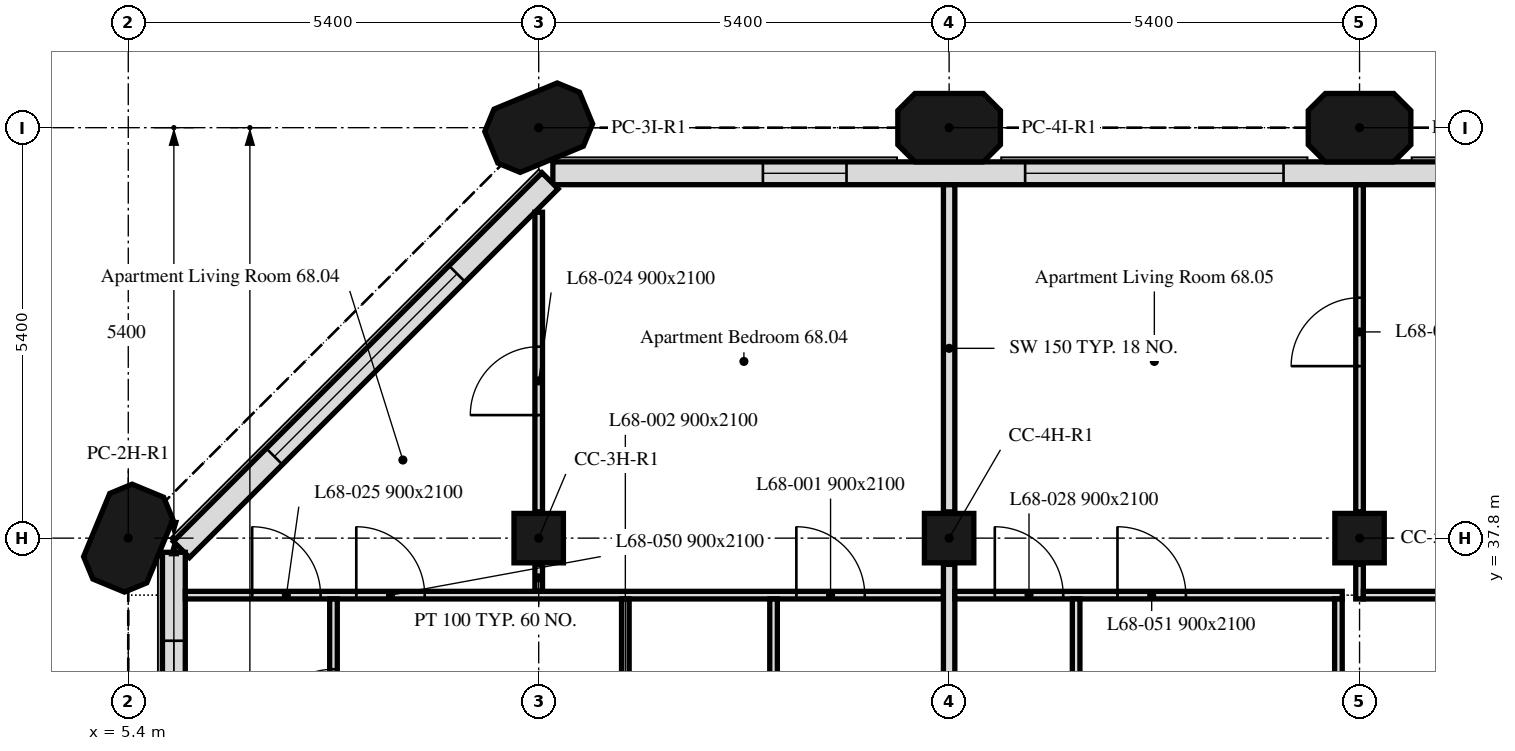
"""IFC4 building model, lengths in metres.
Left out: names, types, materials, properties, quantities, classifications, styles, units other than length and angle.
Written with IfcOpenShell. Run it as: python <this file> out.ifc"""

import sys

from ifc_helpers import new_model, si_unit, direction, frame, frame_2d, origin, origin_2d, place, context, subcontext, project, spatial, polyline, rectangle, outline, extrude, element, fill, save


model = new_model("IFC4")
c1 = context("Model", 3, precision=1e-05, world=origin(), true_north=direction((0.0, 1.0)))
c2 = subcontext(c1, "Body", "Model", "MODEL_VIEW")
j1 = project(units=[si_unit("LENGTHUNIT", "METRE"), si_unit("PLANEANGLEUNIT", "RADIAN")], contexts=[c1])
p1 = place(None, origin())
s1 = spatial("IfcSite", under=j1, at=p1, CompositionType="ELEMENT")
p2 = place(p1, origin())
s2 = spatial("IfcBuilding", under=s1, at=p2, CompositionType="ELEMENT")
p3 = place(p2, frame((0.0, 0.0, 278.5)))
s3 = spatial("IfcBuildingStorey", under=s2, at=p3, CompositionType="ELEMENT", Elevation=278.5)
p4 = place(p3, frame((5.4, 37.8, 0.0), z_axis=(0.0, 0.0, 1.0), x_axis=(0.382683432365, 0.923879532511, 0.0)))
e1 = element("IfcColumn", 1, at=p4, inside=s3, PredefinedType="COLUMN", context=c2, shape_type="SweptSolid", body=[
    extrude(outline(polyline([(-0.45, -0.45), (0.45, -0.45), (0.675, -0.225), (0.675, 0.225), (0.45, 0.45), (-0.45, 0.45), (-0.675, 0.225), (-0.675, -0.225), (-0.45, -0.45)])), origin(), (0.0, 0.0, 1.0), 3.0),
])
for number, where, z_axis, x_axis in (
    (2, (10.8, 37.8, 0.0), (0.0, 0.0, 1.0), (1.0, 0.0, 0.0)),
    (3, (16.2, 37.8, 0.0), (0.0, 0.0, 1.0), (1.0, 0.0, 0.0)),
    (4, (21.6, 37.8, 0.0), (0.0, 0.0, 1.0), (1.0, 0.0, 0.0)),
):
    element("IfcColumn", number, at=place(p3, frame(where, z_axis=z_axis, x_axis=x_axis)), inside=s3, PredefinedType="COLUMN", context=c2, shape_type="SweptSolid", body=[
        extrude(rectangle(XDim=0.65, YDim=0.65, at=origin_2d()), origin(), (0.0, 0.0, 1.0), 3.0),
    ])
for number, where, z_axis, x_axis in (
    (5, (10.8, 43.2, 0.0), (0.0, 0.0, 1.0), (0.924, 0.383, 0.0)),
    (6, (16.2, 43.2, 0.0), (0.0, 0.0, 1.0), (1.0, 0.0, 0.0)),
    (7, (21.6, 43.2, 0.0), (0.0, 0.0, 1.0), (1.0, 0.0, 0.0)),
):
    element("IfcColumn", number, at=place(p3, frame(where, z_axis=z_axis, x_axis=x_axis)), inside=s3, PredefinedType="COLUMN", context=c2, shape_type="SweptSolid", body=[
        extrude(outline(polyline([(-0.45, -0.45), (0.45, -0.45), (0.675, -0.225), (0.675, 0.225), (0.45, 0.45), (-0.45, 0.45), (-0.675, 0.225), (-0.675, -0.225), (-0.45, -0.45)])), origin(), (0.0, 0.0, 1.0), 3.0),
    ])
p5 = place(p3, frame((43.014, 42.6, 0.0), z_axis=(0.0, 0.0, 1.0), x_axis=(-1.0, 0.0, 0.0)))
e8 = element("IfcWall", 8, at=p5, inside=s3, PredefinedType="SOLIDWALL", context=c2, shape_type="SweptSolid", body=[
    extrude(rectangle(XDim=32.027, YDim=0.3, at=frame_2d((16.014, 0.0))), origin(), (0.0, 0.0, 1.0), 3.0),
])
p6 = place(p5, frame((0.814, 0.0, 0.9)))
e9 = element("IfcOpeningElement", 9, at=p6, cuts=e8, PredefinedType="OPENING", context=c2, shape_type="SweptSolid", body=[
    extrude(rectangle(XDim=3.4, YDim=1.7, at=frame_2d((1.7, 0.85))), frame((0.0, 0.16, 0.0), z_axis=(0.0, -1.0, 0.0), x_axis=(1.0, 0.0, 0.0)), (0.0, 0.0, 1.0), 0.32),
])
p7 = place(p5, frame((6.564, 0.0, 0.9)))
e10 = element("IfcOpeningElement", 10, at=p7, cuts=e8, PredefinedType="OPENING", context=c2, shape_type="SweptSolid", body=[
    extrude(rectangle(XDim=1.1, YDim=1.7, at=frame_2d((0.55, 0.85))), frame((0.0, 0.16, 0.0), z_axis=(0.0, -1.0, 0.0), x_axis=(1.0, 0.0, 0.0)), (0.0, 0.0, 1.0), 0.32),
])
p8 = place(p5, frame((11.614, 0.0, 0.9)))
e11 = element("IfcOpeningElement", 11, at=p8, cuts=e8, PredefinedType="OPENING", context=c2, shape_type="SweptSolid", body=[
    extrude(rectangle(XDim=3.4, YDim=1.7, at=frame_2d((1.7, 0.85))), frame((0.0, 0.16, 0.0), z_axis=(0.0, -1.0, 0.0), x_axis=(1.0, 0.0, 0.0)), (0.0, 0.0, 1.0), 0.32),
])
p9 = place(p5, frame((17.364, 0.0, 0.9)))
e12 = element("IfcOpeningElement", 12, at=p9, cuts=e8, PredefinedType="OPENING", context=c2, shape_type="SweptSolid", body=[
    extrude(rectangle(XDim=1.1, YDim=1.7, at=frame_2d((0.55, 0.85))), frame((0.0, 0.16, 0.0), z_axis=(0.0, -1.0, 0.0), x_axis=(1.0, 0.0, 0.0)), (0.0, 0.0, 1.0), 0.32),
])
p10 = place(p5, frame((22.414, 0.0, 0.9)))
e13 = element("IfcOpeningElement", 13, at=p10, cuts=e8, PredefinedType="OPENING", context=c2, shape_type="SweptSolid", body=[
    extrude(rectangle(XDim=3.4, YDim=1.7, at=frame_2d((1.7, 0.85))), frame((0.0, 0.16, 0.0), z_axis=(0.0, -1.0, 0.0), x_axis=(1.0, 0.0, 0.0)), (0.0, 0.0, 1.0), 0.32),
])
p11 = place(p5, frame((28.164, 0.0, 0.9)))
e14 = element("IfcOpeningElement", 14, at=p11, cuts=e8, PredefinedType="OPENING", context=c2, shape_type="SweptSolid", body=[
    extrude(rectangle(XDim=1.1, YDim=1.7, at=frame_2d((0.55, 0.85))), frame((0.0, 0.16, 0.0), z_axis=(0.0, -1.0, 0.0), x_axis=(1.0, 0.0, 0.0)), (0.0, 0.0, 1.0), 0.32),
])
p12 = place(p3, frame((10.949, 42.501, 0.0), z_axis=(0.0, 0.0, 1.0), x_axis=(-0.707106781187, -0.707106781187, 0.0)))
e15 = element("IfcWall", 15, at=p12, inside=s3, PredefinedType="SOLIDWALL", context=c2, shape_type="SweptSolid", body=[
    extrude(rectangle(XDim=6.86, YDim=0.3, at=frame_2d((3.43, 0.0))), origin(), (0.0, 0.0, 1.0), 3.0),
])
p13 = place(p12, frame((1.73, 0.0, 0.9)))
e16 = element("IfcOpeningElement", 16, at=p13, cuts=e15, PredefinedType="OPENING", context=c2, shape_type="SweptSolid", body=[
    extrude(rectangle(XDim=3.4, YDim=1.7, at=frame_2d((1.7, 0.85))), frame((0.0, 0.16, 0.0), z_axis=(0.0, -1.0, 0.0), x_axis=(1.0, 0.0, 0.0)), (0.0, 0.0, 1.0), 0.32),
])
p14 = place(p3, frame((6.0, 37.614, 0.0), z_axis=(0.0, 0.0, 1.0), x_axis=(0.0, -1.0, 0.0)))
e17 = element("IfcWall", 17, at=p14, inside=s3, PredefinedType="SOLIDWALL", context=c2, shape_type="SweptSolid", body=[
    extrude(rectangle(XDim=5.214, YDim=0.3, at=frame_2d((2.607, 0.0))), origin(), (0.0, 0.0, 1.0), 3.0),
])
p15 = place(p14, frame((1.164, 0.0, 0.9)))
e18 = element("IfcOpeningElement", 18, at=p15, cuts=e17, PredefinedType="OPENING", context=c2, shape_type="SweptSolid", body=[
    extrude(rectangle(XDim=1.1, YDim=1.7, at=frame_2d((0.55, 0.85))), frame((0.0, 0.16, 0.0), z_axis=(0.0, -1.0, 0.0), x_axis=(1.0, 0.0, 0.0)), (0.0, 0.0, 1.0), 0.32),
])
p16 = place(p14, frame((2.589, 0.0, 0.9)))
e19 = element("IfcOpeningElement", 19, at=p16, cuts=e17, PredefinedType="OPENING", context=c2, shape_type="SweptSolid", body=[
    extrude(rectangle(XDim=0.65, YDim=1.7, at=frame_2d((0.325, 0.85))), frame((0.0, 0.16, 0.0), z_axis=(0.0, -1.0, 0.0), x_axis=(1.0, 0.0, 0.0)), (0.0, 0.0, 1.0), 0.32),
])
p17 = place(p3, frame((10.8, 37.1, 0.0), z_axis=(0.0, 0.0, 1.0), x_axis=(0.0, 1.0, 0.0)))
e20 = element("IfcWall", 20, at=p17, inside=s3, PredefinedType="PARTITIONING", context=c2, shape_type="SweptSolid", body=[
    extrude(rectangle(XDim=0.355, YDim=0.1, at=frame_2d((0.177, 0.0))), origin(), (0.0, 0.0, 1.0), 3.0),
])
p18 = place(p3, frame((10.8, 38.145, 0.0), z_axis=(0.0, 0.0, 1.0), x_axis=(0.0, 1.0, 0.0)))
e21 = element("IfcWall", 21, at=p18, inside=s3, PredefinedType="PARTITIONING", context=c2, shape_type="SweptSolid", body=[
    extrude(rectangle(XDim=3.943, YDim=0.1, at=frame_2d((1.971, 0.0))), origin(), (0.0, 0.0, 1.0), 3.0),
])
p19 = place(p18, frame((1.274, 0.0, 0.0)))
e22 = element("IfcOpeningElement", 22, at=p19, cuts=e21, PredefinedType="OPENING", context=c2, shape_type="SweptSolid", body=[
    extrude(rectangle(XDim=0.9, YDim=2.1, at=frame_2d((0.45, 1.05))), frame((0.0, 0.05, 0.0), z_axis=(0.0, -1.0, 0.0), x_axis=(1.0, 0.0, 0.0)), (0.0, 0.0, 1.0), 0.1),
])
p20 = place(p3, frame((6.151, 37.05, 0.0), z_axis=(0.0, 0.0, 1.0), x_axis=(1.0, 0.0, 0.0)))
e23 = element("IfcWall", 23, at=p20, inside=s3, PredefinedType="PARTITIONING", context=c2, shape_type="SweptSolid", body=[
    extrude(rectangle(XDim=9.974, YDim=0.1, at=frame_2d((4.987, 0.0))), origin(), (0.0, 0.0, 1.0), 3.0),
])
p21 = place(p20, frame((8.039, 0.0, 0.0)))
e24 = element("IfcOpeningElement", 24, at=p21, cuts=e23, PredefinedType="OPENING", context=c2, shape_type="SweptSolid", body=[
    extrude(rectangle(XDim=0.9, YDim=2.1, at=frame_2d((0.45, 1.05))), frame((0.0, 0.05, 0.0), z_axis=(0.0, -1.0, 0.0), x_axis=(1.0, 0.0, 0.0)), (0.0, 0.0, 1.0), 0.1),
])
p22 = place(p20, frame((0.879, 0.0, 0.0)))
e25 = element("IfcOpeningElement", 25, at=p22, cuts=e23, PredefinedType="OPENING", context=c2, shape_type="SweptSolid", body=[
    extrude(rectangle(XDim=0.9, YDim=2.1, at=frame_2d((0.45, 1.05))), frame((0.0, 0.05, 0.0), z_axis=(0.0, -1.0, 0.0), x_axis=(1.0, 0.0, 0.0)), (0.0, 0.0, 1.0), 0.1),
])
p23 = place(p20, frame((2.249, 0.0, 0.0)))
e26 = element("IfcOpeningElement", 26, at=p23, cuts=e23, PredefinedType="OPENING", context=c2, shape_type="SweptSolid", body=[
    extrude(rectangle(XDim=0.9, YDim=2.1, at=frame_2d((0.45, 1.05))), frame((0.0, 0.05, 0.0), z_axis=(0.0, -1.0, 0.0), x_axis=(1.0, 0.0, 0.0)), (0.0, 0.0, 1.0), 0.1),
])
p24 = place(p3, frame((16.2, 38.145, 0.0), z_axis=(0.0, 0.0, 1.0), x_axis=(0.0, 1.0, 0.0)))
e27 = element("IfcWall", 27, at=p24, inside=s3, PredefinedType="PARTITIONING", context=c2, shape_type="SweptSolid", body=[
    extrude(rectangle(XDim=4.304, YDim=0.15, at=frame_2d((2.152, 0.0))), origin(), (0.0, 0.0, 1.0), 3.0),
])
p25 = place(p3, frame((8.1, 34.275, 0.0), z_axis=(0.0, 0.0, 1.0), x_axis=(0.0, 1.0, 0.0)))
e28 = element("IfcWall", 28, at=p25, inside=s3, PredefinedType="PARTITIONING", context=c2, shape_type="SweptSolid", body=[
    extrude(rectangle(XDim=2.725, YDim=0.1, at=frame_2d((1.363, 0.0))), origin(), (0.0, 0.0, 1.0), 3.0),
])
p26 = place(p25, frame((0.9, 0.0, 0.0)))
e29 = element("IfcOpeningElement", 29, at=p26, cuts=e28, PredefinedType="OPENING", context=c2, shape_type="SweptSolid", body=[
    extrude(rectangle(XDim=0.9, YDim=2.1, at=frame_2d((0.45, 1.05))), frame((0.0, 0.05, 0.0), z_axis=(0.0, -1.0, 0.0), x_axis=(1.0, 0.0, 0.0)), (0.0, 0.0, 1.0), 0.1),
])
p27 = place(p3, frame((11.94, 34.275, 0.0), z_axis=(0.0, 0.0, 1.0), x_axis=(0.0, 1.0, 0.0)))
e30 = element("IfcWall", 30, at=p27, inside=s3, PredefinedType="PARTITIONING", context=c2, shape_type="SweptSolid", body=[
    extrude(rectangle(XDim=2.725, YDim=0.1, at=frame_2d((1.363, 0.0))), origin(), (0.0, 0.0, 1.0), 3.0),
])
p28 = place(p27, frame((0.281, 0.0, 0.0)))
e31 = element("IfcOpeningElement", 31, at=p28, cuts=e30, PredefinedType="OPENING", context=c2, shape_type="SweptSolid", body=[
    extrude(rectangle(XDim=0.9, YDim=2.1, at=frame_2d((0.45, 1.05))), frame((0.0, 0.05, 0.0), z_axis=(0.0, -1.0, 0.0), x_axis=(1.0, 0.0, 0.0)), (0.0, 0.0, 1.0), 0.1),
])
p29 = place(p3, frame((13.89, 34.275, 0.0), z_axis=(0.0, 0.0, 1.0), x_axis=(0.0, 1.0, 0.0)))
e32 = element("IfcWall", 32, at=p29, inside=s3, PredefinedType="PARTITIONING", context=c2, shape_type="SweptSolid", body=[
    extrude(rectangle(XDim=2.725, YDim=0.1, at=frame_2d((1.363, 0.0))), origin(), (0.0, 0.0, 1.0), 3.0),
])
p30 = place(p3, frame((16.2, 34.275, 0.0), z_axis=(0.0, 0.0, 1.0), x_axis=(0.0, 1.0, 0.0)))
e33 = element("IfcWall", 33, at=p30, inside=s3, PredefinedType="PARTITIONING", context=c2, shape_type="SweptSolid", body=[
    extrude(rectangle(XDim=3.18, YDim=0.15, at=frame_2d((1.59, 0.0))), origin(), (0.0, 0.0, 1.0), 3.0),
])
p31 = place(p3, frame((16.275, 37.05, 0.0), z_axis=(0.0, 0.0, 1.0), x_axis=(1.0, 0.0, 0.0)))
e34 = element("IfcWall", 34, at=p31, inside=s3, PredefinedType="PARTITIONING", context=c2, shape_type="SweptSolid", body=[
    extrude(rectangle(XDim=5.097, YDim=0.1, at=frame_2d((2.549, 0.0))), origin(), (0.0, 0.0, 1.0), 3.0),
])
p32 = place(p31, frame((0.526, 0.0, 0.0)))
e35 = element("IfcOpeningElement", 35, at=p32, cuts=e34, PredefinedType="OPENING", context=c2, shape_type="SweptSolid", body=[
    extrude(rectangle(XDim=0.9, YDim=2.1, at=frame_2d((0.45, 1.05))), frame((0.0, 0.05, 0.0), z_axis=(0.0, -1.0, 0.0), x_axis=(1.0, 0.0, 0.0)), (0.0, 0.0, 1.0), 0.1),
])
p33 = place(p31, frame((2.14, 0.0, 0.0)))
e36 = element("IfcOpeningElement", 36, at=p33, cuts=e34, PredefinedType="OPENING", context=c2, shape_type="SweptSolid", body=[
    extrude(rectangle(XDim=0.9, YDim=2.1, at=frame_2d((0.45, 1.05))), frame((0.0, 0.05, 0.0), z_axis=(0.0, -1.0, 0.0), x_axis=(1.0, 0.0, 0.0)), (0.0, 0.0, 1.0), 0.1),
])
p34 = place(p3, frame((21.6, 37.0, 0.0), z_axis=(0.0, 0.0, 1.0), x_axis=(0.0, 1.0, 0.0)))
e37 = element("IfcWall", 37, at=p34, inside=s3, PredefinedType="PARTITIONING", context=c2, shape_type="SweptSolid", body=[
    extrude(rectangle(XDim=0.455, YDim=0.1, at=frame_2d((0.228, 0.0))), origin(), (0.0, 0.0, 1.0), 3.0),
])
p35 = place(p3, frame((21.6, 38.145, 0.0), z_axis=(0.0, 0.0, 1.0), x_axis=(0.0, 1.0, 0.0)))
e38 = element("IfcWall", 38, at=p35, inside=s3, PredefinedType="PARTITIONING", context=c2, shape_type="SweptSolid", body=[
    extrude(rectangle(XDim=4.304, YDim=0.1, at=frame_2d((2.152, 0.0))), origin(), (0.0, 0.0, 1.0), 3.0),
])
p36 = place(p35, frame((1.918, 0.0, 0.0)))
e39 = element("IfcOpeningElement", 39, at=p36, cuts=e38, PredefinedType="OPENING", context=c2, shape_type="SweptSolid", body=[
    extrude(rectangle(XDim=0.9, YDim=2.1, at=frame_2d((0.45, 1.05))), frame((0.0, 0.05, 0.0), z_axis=(0.0, -1.0, 0.0), x_axis=(1.0, 0.0, 0.0)), (0.0, 0.0, 1.0), 0.1),
])
p37 = place(p3, frame((21.65, 37.05, 0.0), z_axis=(0.0, 0.0, 1.0), x_axis=(1.0, 0.0, 0.0)))
e40 = element("IfcWall", 40, at=p37, inside=s3, PredefinedType="PARTITIONING", context=c2, shape_type="SweptSolid", body=[
    extrude(rectangle(XDim=5.275, YDim=0.1, at=frame_2d((2.638, 0.0))), origin(), (0.0, 0.0, 1.0), 3.0),
])
p38 = place(p37, frame((2.933, 0.0, 0.0)))
e41 = element("IfcOpeningElement", 41, at=p38, cuts=e40, PredefinedType="OPENING", context=c2, shape_type="SweptSolid", body=[
    extrude(rectangle(XDim=0.9, YDim=2.1, at=frame_2d((0.45, 1.05))), frame((0.0, 0.05, 0.0), z_axis=(0.0, -1.0, 0.0), x_axis=(1.0, 0.0, 0.0)), (0.0, 0.0, 1.0), 0.1),
])
p39 = place(p3, frame((17.871, 34.275, 0.0), z_axis=(0.0, 0.0, 1.0), x_axis=(0.0, 1.0, 0.0)))
e42 = element("IfcWall", 42, at=p39, inside=s3, PredefinedType="PARTITIONING", context=c2, shape_type="SweptSolid", body=[
    extrude(rectangle(XDim=2.725, YDim=0.1, at=frame_2d((1.363, 0.0))), origin(), (0.0, 0.0, 1.0), 3.0),
])
p40 = place(p39, frame((0.563, 0.0, 0.0)))
e43 = element("IfcOpeningElement", 43, at=p40, cuts=e42, PredefinedType="OPENING", context=c2, shape_type="SweptSolid", body=[
    extrude(rectangle(XDim=0.9, YDim=2.1, at=frame_2d((0.45, 1.05))), frame((0.0, 0.05, 0.0), z_axis=(0.0, -1.0, 0.0), x_axis=(1.0, 0.0, 0.0)), (0.0, 0.0, 1.0), 0.1),
])
p41 = place(p3, frame((21.322, 34.275, 0.0), z_axis=(0.0, 0.0, 1.0), x_axis=(0.0, 1.0, 0.0)))
e44 = element("IfcWall", 44, at=p41, inside=s3, PredefinedType="PARTITIONING", context=c2, shape_type="SweptSolid", body=[
    extrude(rectangle(XDim=2.725, YDim=0.1, at=frame_2d((1.363, 0.0))), origin(), (0.0, 0.0, 1.0), 3.0),
])
p42 = place(p41, frame((0.394, 0.0, 0.0)))
e45 = element("IfcOpeningElement", 45, at=p42, cuts=e44, PredefinedType="OPENING", context=c2, shape_type="SweptSolid", body=[
    extrude(rectangle(XDim=0.9, YDim=2.1, at=frame_2d((0.45, 1.05))), frame((0.0, 0.05, 0.0), z_axis=(0.0, -1.0, 0.0), x_axis=(1.0, 0.0, 0.0)), (0.0, 0.0, 1.0), 0.1),
])
p43 = place(p10, origin())
e46 = element("IfcWindow", 46, at=p43, inside=s3, PartitioningType="SINGLE_PANEL", PredefinedType="WINDOW", context=c2, shape_type="SweptSolid", body=[
    extrude(rectangle(XDim=3.4, YDim=1.7, at=frame_2d((1.7, 0.85))), frame((0.0, 0.03, 0.0), z_axis=(0.0, -1.0, 0.0), x_axis=(1.0, 0.0, 0.0)), (0.0, 0.0, 1.0), 0.06),
])
fill(e13, e46)
p44 = place(p11, origin())
e47 = element("IfcWindow", 47, at=p44, inside=s3, PartitioningType="SINGLE_PANEL", PredefinedType="WINDOW", context=c2, shape_type="SweptSolid", body=[
    extrude(rectangle(XDim=1.1, YDim=1.7, at=frame_2d((0.55, 0.85))), frame((0.0, 0.03, 0.0), z_axis=(0.0, -1.0, 0.0), x_axis=(1.0, 0.0, 0.0)), (0.0, 0.0, 1.0), 0.06),
])
fill(e14, e47)
p45 = place(p13, origin())
e48 = element("IfcWindow", 48, at=p45, inside=s3, PartitioningType="SINGLE_PANEL", PredefinedType="WINDOW", context=c2, shape_type="SweptSolid", body=[
    extrude(rectangle(XDim=3.4, YDim=1.7, at=frame_2d((1.7, 0.85))), frame((0.0, 0.03, 0.0), z_axis=(0.0, -1.0, 0.0), x_axis=(1.0, 0.0, 0.0)), (0.0, 0.0, 1.0), 0.06),
])
fill(e16, e48)
p46 = place(p15, origin())
e49 = element("IfcWindow", 49, at=p46, inside=s3, PartitioningType="SINGLE_PANEL", PredefinedType="WINDOW", context=c2, shape_type="SweptSolid", body=[
    extrude(rectangle(XDim=1.1, YDim=1.7, at=frame_2d((0.55, 0.85))), frame((0.0, 0.03, 0.0), z_axis=(0.0, -1.0, 0.0), x_axis=(1.0, 0.0, 0.0)), (0.0, 0.0, 1.0), 0.06),
])
fill(e18, e49)
p47 = place(p21, origin())
e50 = element("IfcDoor", 50, at=p47, inside=s3, OperationType="SINGLE_SWING_LEFT", PredefinedType="DOOR", context=c2, shape_type="SweptSolid", body=[
    extrude(rectangle(XDim=0.9, YDim=2.1, at=frame_2d((0.45, 1.05))), frame((0.0, 0.025, 0.0), z_axis=(0.0, -1.0, 0.0), x_axis=(1.0, 0.0, 0.0)), (0.0, 0.0, 1.0), 0.05),
])
fill(e24, e50)
p48 = place(p19, origin())
e51 = element("IfcDoor", 51, at=p48, inside=s3, OperationType="SINGLE_SWING_RIGHT", PredefinedType="DOOR", context=c2, shape_type="SweptSolid", body=[
    extrude(rectangle(XDim=0.9, YDim=2.1, at=frame_2d((0.45, 1.05))), frame((0.0, 0.025, 0.0), z_axis=(0.0, -1.0, 0.0), x_axis=(1.0, 0.0, 0.0)), (0.0, 0.0, 1.0), 0.05),
])
fill(e22, e51)
p49 = place(p22, origin())
e52 = element("IfcDoor", 52, at=p49, inside=s3, OperationType="SINGLE_SWING_RIGHT", PredefinedType="DOOR", context=c2, shape_type="SweptSolid", body=[
    extrude(rectangle(XDim=0.9, YDim=2.1, at=frame_2d((0.45, 1.05))), frame((0.0, 0.025, 0.0), z_axis=(0.0, -1.0, 0.0), x_axis=(1.0, 0.0, 0.0)), (0.0, 0.0, 1.0), 0.05),
])
fill(e25, e52)
p50 = place(p26, origin())
e53 = element("IfcDoor", 53, at=p50, inside=s3, OperationType="SINGLE_SWING_LEFT", PredefinedType="DOOR", context=c2, shape_type="SweptSolid", body=[
    extrude(rectangle(XDim=0.9, YDim=2.1, at=frame_2d((0.45, 1.05))), frame((0.0, 0.025, 0.0), z_axis=(0.0, -1.0, 0.0), x_axis=(1.0, 0.0, 0.0)), (0.0, 0.0, 1.0), 0.05),
])
fill(e29, e53)
p51 = place(p36, origin())
e54 = element("IfcDoor", 54, at=p51, inside=s3, OperationType="SINGLE_SWING_RIGHT", PredefinedType="DOOR", context=c2, shape_type="SweptSolid", body=[
    extrude(rectangle(XDim=0.9, YDim=2.1, at=frame_2d((0.45, 1.05))), frame((0.0, 0.025, 0.0), z_axis=(0.0, -1.0, 0.0), x_axis=(1.0, 0.0, 0.0)), (0.0, 0.0, 1.0), 0.05),
])
fill(e39, e54)
p52 = place(p32, origin())
e55 = element("IfcDoor", 55, at=p52, inside=s3, OperationType="SINGLE_SWING_RIGHT", PredefinedType="DOOR", context=c2, shape_type="SweptSolid", body=[
    extrude(rectangle(XDim=0.9, YDim=2.1, at=frame_2d((0.45, 1.05))), frame((0.0, 0.025, 0.0), z_axis=(0.0, -1.0, 0.0), x_axis=(1.0, 0.0, 0.0)), (0.0, 0.0, 1.0), 0.05),
])
fill(e35, e55)
p53 = place(p23, origin())
e56 = element("IfcDoor", 56, at=p53, inside=s3, OperationType="SINGLE_SWING_LEFT", PredefinedType="DOOR", context=c2, shape_type="SweptSolid", body=[
    extrude(rectangle(XDim=0.9, YDim=2.1, at=frame_2d((0.45, 1.05))), frame((0.0, 0.025, 0.0), z_axis=(0.0, -1.0, 0.0), x_axis=(1.0, 0.0, 0.0)), (0.0, 0.0, 1.0), 0.05),
])
fill(e26, e56)
p54 = place(p33, origin())
e57 = element("IfcDoor", 57, at=p54, inside=s3, OperationType="SINGLE_SWING_LEFT", PredefinedType="DOOR", context=c2, shape_type="SweptSolid", body=[
    extrude(rectangle(XDim=0.9, YDim=2.1, at=frame_2d((0.45, 1.05))), frame((0.0, 0.025, 0.0), z_axis=(0.0, -1.0, 0.0), x_axis=(1.0, 0.0, 0.0)), (0.0, 0.0, 1.0), 0.05),
])
fill(e36, e57)
save(model, sys.argv[1])
